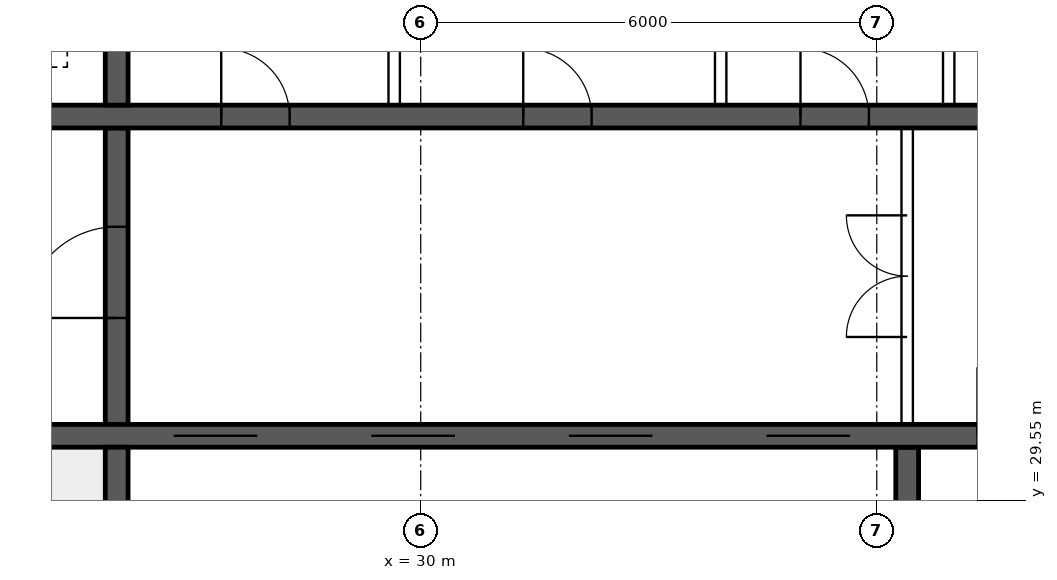
"""IFC4 building model, lengths in metres.
Left out: names, types, materials, properties, quantities, classifications, styles, units other than length and angle.
Written with IfcOpenShell. Run it as: python <this file> out.ifc"""

import sys

from ifc_helpers import new_model, si_unit, direction, frame, frame_2d, origin, place, context, subcontext, project, spatial, rectangle, extrude, element, fill, save


model = new_model("IFC4")
c1 = context("Model", 3, precision=1e-05, world=origin(), true_north=direction((0.0, 1.0)))
c2 = subcontext(c1, "Body", "Model", "MODEL_VIEW")
j1 = project(units=[si_unit("LENGTHUNIT", "METRE"), si_unit("PLANEANGLEUNIT", "RADIAN")], contexts=[c1])
p1 = place(None, origin())
s1 = spatial("IfcSite", under=j1, at=p1, CompositionType="ELEMENT")
p2 = place(p1, origin())
s2 = spatial("IfcBuilding", under=s1, at=p2, CompositionType="ELEMENT")
p3 = place(p2, frame((0.0, 0.0, 163.6)))
s3 = spatial("IfcBuildingStorey", under=s2, at=p3, CompositionType="ELEMENT", Elevation=163.6)
p4 = place(p3, frame((18.425, 30.4, 0.0), z_axis=(0.0, 0.0, 1.0), x_axis=(1.0, 0.0, 0.0)))
e1 = element("IfcWall", 1, at=p4, inside=s3, PredefinedType="SHEAR", context=c2, shape_type="SweptSolid", body=[
    extrude(rectangle(XDim=47.15, YDim=0.3, at=frame_2d((23.575, 0.0))), origin(), (0.0, 0.0, 1.0), 3.75),
])
p5 = place(p4, frame((0.4, 0.0, 0.0)))
e2 = element("IfcOpeningElement", 2, at=p5, cuts=e1, PredefinedType="OPENING", context=c2, shape_type="SweptSolid", body=[
    extrude(rectangle(XDim=1.0, YDim=2.1, at=frame_2d((0.5, 1.05))), frame((0.0, 0.16, 0.0), z_axis=(0.0, -1.0, 0.0), x_axis=(1.0, 0.0, 0.0)), (0.0, 0.0, 1.0), 0.32),
])
p6 = place(p4, frame((45.75, 0.0, 0.0)))
e3 = element("IfcOpeningElement", 3, at=p6, cuts=e1, PredefinedType="OPENING", context=c2, shape_type="SweptSolid", body=[
    extrude(rectangle(XDim=1.0, YDim=2.1, at=frame_2d((0.5, 1.05))), frame((0.0, 0.16, 0.0), z_axis=(0.0, -1.0, 0.0), x_axis=(1.0, 0.0, 0.0)), (0.0, 0.0, 1.0), 0.32),
])
p7 = place(p4, frame((8.325, 0.0, 0.0)))
e4 = element("IfcOpeningElement", 4, at=p7, cuts=e1, PredefinedType="OPENING", context=c2, shape_type="SweptSolid", body=[
    extrude(rectangle(XDim=1.1, YDim=2.1, at=frame_2d((0.55, 1.05))), frame((0.0, 0.16, 0.0), z_axis=(0.0, -1.0, 0.0), x_axis=(1.0, 0.0, 0.0)), (0.0, 0.0, 1.0), 0.32),
])
p8 = place(p4, frame((10.925, 0.0, 0.0)))
e5 = element("IfcOpeningElement", 5, at=p8, cuts=e1, PredefinedType="OPENING", context=c2, shape_type="SweptSolid", body=[
    extrude(rectangle(XDim=1.1, YDim=2.1, at=frame_2d((0.55, 1.05))), frame((0.0, 0.16, 0.0), z_axis=(0.0, -1.0, 0.0), x_axis=(1.0, 0.0, 0.0)), (0.0, 0.0, 1.0), 0.32),
])
p9 = place(p4, frame((13.525, 0.0, 0.0)))
e6 = element("IfcOpeningElement", 6, at=p9, cuts=e1, PredefinedType="OPENING", context=c2, shape_type="SweptSolid", body=[
    extrude(rectangle(XDim=1.1, YDim=2.1, at=frame_2d((0.55, 1.05))), frame((0.0, 0.16, 0.0), z_axis=(0.0, -1.0, 0.0), x_axis=(1.0, 0.0, 0.0)), (0.0, 0.0, 1.0), 0.32),
])
p10 = place(p4, frame((16.125, 0.0, 0.0)))
e7 = element("IfcOpeningElement", 7, at=p10, cuts=e1, PredefinedType="OPENING", context=c2, shape_type="SweptSolid", body=[
    extrude(rectangle(XDim=1.1, YDim=2.1, at=frame_2d((0.55, 1.05))), frame((0.0, 0.16, 0.0), z_axis=(0.0, -1.0, 0.0), x_axis=(1.0, 0.0, 0.0)), (0.0, 0.0, 1.0), 0.32),
])
p11 = place(p4, frame((18.9, 0.0, 0.0)))
e8 = element("IfcOpeningElement", 8, at=p11, cuts=e1, PredefinedType="OPENING", context=c2, shape_type="SweptSolid", body=[
    extrude(rectangle(XDim=0.9, YDim=2.1, at=frame_2d((0.45, 1.05))), frame((0.0, 0.16, 0.0), z_axis=(0.0, -1.0, 0.0), x_axis=(1.0, 0.0, 0.0)), (0.0, 0.0, 1.0), 0.32),
])
p12 = place(p4, frame((30.192, 0.0, 0.0)))
e9 = element("IfcOpeningElement", 9, at=p12, cuts=e1, PredefinedType="OPENING", context=c2, shape_type="SweptSolid", body=[
    extrude(rectangle(XDim=1.1, YDim=2.1, at=frame_2d((0.55, 1.05))), frame((0.0, 0.16, 0.0), z_axis=(0.0, -1.0, 0.0), x_axis=(1.0, 0.0, 0.0)), (0.0, 0.0, 1.0), 0.32),
])
p13 = place(p4, frame((33.725, 0.0, 0.0)))
e10 = element("IfcOpeningElement", 10, at=p13, cuts=e1, PredefinedType="OPENING", context=c2, shape_type="SweptSolid", body=[
    extrude(rectangle(XDim=1.1, YDim=2.1, at=frame_2d((0.55, 1.05))), frame((0.0, 0.16, 0.0), z_axis=(0.0, -1.0, 0.0), x_axis=(1.0, 0.0, 0.0)), (0.0, 0.0, 1.0), 0.32),
])
p14 = place(p4, frame((37.258, 0.0, 0.0)))
e11 = element("IfcOpeningElement", 11, at=p14, cuts=e1, PredefinedType="OPENING", context=c2, shape_type="SweptSolid", body=[
    extrude(rectangle(XDim=1.1, YDim=2.1, at=frame_2d((0.55, 1.05))), frame((0.0, 0.16, 0.0), z_axis=(0.0, -1.0, 0.0), x_axis=(1.0, 0.0, 0.0)), (0.0, 0.0, 1.0), 0.32),
])
p15 = place(p3, frame((18.425, 34.6, 0.0), z_axis=(0.0, 0.0, 1.0), x_axis=(1.0, 0.0, 0.0)))
e12 = element("IfcWall", 12, at=p15, inside=s3, PredefinedType="SHEAR", context=c2, shape_type="SweptSolid", body=[
    extrude(rectangle(XDim=47.15, YDim=0.3, at=frame_2d((23.575, 0.0))), origin(), (0.0, 0.0, 1.0), 3.75),
])
p16 = place(p15, frame((0.9, 0.0, 0.0)))
e13 = element("IfcOpeningElement", 13, at=p16, cuts=e12, PredefinedType="OPENING", context=c2, shape_type="SweptSolid", body=[
    extrude(rectangle(XDim=1.1, YDim=2.1, at=frame_2d((0.55, 1.05))), frame((0.0, 0.16, 0.0), z_axis=(0.0, -1.0, 0.0), x_axis=(1.0, 0.0, 0.0)), (0.0, 0.0, 1.0), 0.32),
])
p17 = place(p15, frame((45.15, 0.0, 0.0)))
e14 = element("IfcOpeningElement", 14, at=p17, cuts=e12, PredefinedType="OPENING", context=c2, shape_type="SweptSolid", body=[
    extrude(rectangle(XDim=1.1, YDim=2.1, at=frame_2d((0.55, 1.05))), frame((0.0, 0.16, 0.0), z_axis=(0.0, -1.0, 0.0), x_axis=(1.0, 0.0, 0.0)), (0.0, 0.0, 1.0), 0.32),
])
p18 = place(p15, frame((4.175, 0.0, 0.0)))
e15 = element("IfcOpeningElement", 15, at=p18, cuts=e12, PredefinedType="OPENING", context=c2, shape_type="SweptSolid", body=[
    extrude(rectangle(XDim=0.9, YDim=2.1, at=frame_2d((0.45, 1.05))), frame((0.0, 0.16, 0.0), z_axis=(0.0, -1.0, 0.0), x_axis=(1.0, 0.0, 0.0)), (0.0, 0.0, 1.0), 0.32),
])
p19 = place(p15, frame((42.075, 0.0, 0.0)))
e16 = element("IfcOpeningElement", 16, at=p19, cuts=e12, PredefinedType="OPENING", context=c2, shape_type="SweptSolid", body=[
    extrude(rectangle(XDim=0.9, YDim=2.1, at=frame_2d((0.45, 1.05))), frame((0.0, 0.16, 0.0), z_axis=(0.0, -1.0, 0.0), x_axis=(1.0, 0.0, 0.0)), (0.0, 0.0, 1.0), 0.32),
])
p20 = place(p15, frame((8.95, 0.0, 0.0)))
e17 = element("IfcOpeningElement", 17, at=p20, cuts=e12, PredefinedType="OPENING", context=c2, shape_type="SweptSolid", body=[
    extrude(rectangle(XDim=0.9, YDim=2.1, at=frame_2d((0.45, 1.05))), frame((0.0, 0.16, 0.0), z_axis=(0.0, -1.0, 0.0), x_axis=(1.0, 0.0, 0.0)), (0.0, 0.0, 1.0), 0.32),
])
p21 = place(p15, frame((12.924, 0.0, 0.0)))
e18 = element("IfcOpeningElement", 18, at=p21, cuts=e12, PredefinedType="OPENING", context=c2, shape_type="SweptSolid", body=[
    extrude(rectangle(XDim=0.9, YDim=2.1, at=frame_2d((0.45, 1.05))), frame((0.0, 0.16, 0.0), z_axis=(0.0, -1.0, 0.0), x_axis=(1.0, 0.0, 0.0)), (0.0, 0.0, 1.0), 0.32),
])
p22 = place(p15, frame((16.571, 0.0, 0.0)))
e19 = element("IfcOpeningElement", 19, at=p22, cuts=e12, PredefinedType="OPENING", context=c2, shape_type="SweptSolid", body=[
    extrude(rectangle(XDim=0.9, YDim=2.1, at=frame_2d((0.45, 1.05))), frame((0.0, 0.16, 0.0), z_axis=(0.0, -1.0, 0.0), x_axis=(1.0, 0.0, 0.0)), (0.0, 0.0, 1.0), 0.32),
])
p23 = place(p15, frame((20.33, 0.0, 0.0)))
e20 = element("IfcOpeningElement", 20, at=p23, cuts=e12, PredefinedType="OPENING", context=c2, shape_type="SweptSolid", body=[
    extrude(rectangle(XDim=0.9, YDim=2.1, at=frame_2d((0.45, 1.05))), frame((0.0, 0.16, 0.0), z_axis=(0.0, -1.0, 0.0), x_axis=(1.0, 0.0, 0.0)), (0.0, 0.0, 1.0), 0.32),
])
p24 = place(p15, frame((24.736, 0.0, 0.0)))
e21 = element("IfcOpeningElement", 21, at=p24, cuts=e12, PredefinedType="OPENING", context=c2, shape_type="SweptSolid", body=[
    extrude(rectangle(XDim=0.9, YDim=2.1, at=frame_2d((0.45, 1.05))), frame((0.0, 0.16, 0.0), z_axis=(0.0, -1.0, 0.0), x_axis=(1.0, 0.0, 0.0)), (0.0, 0.0, 1.0), 0.32),
])
p25 = place(p15, frame((27.533, 0.0, 0.0)))
e22 = element("IfcOpeningElement", 22, at=p25, cuts=e12, PredefinedType="OPENING", context=c2, shape_type="SweptSolid", body=[
    extrude(rectangle(XDim=0.9, YDim=2.1, at=frame_2d((0.45, 1.05))), frame((0.0, 0.16, 0.0), z_axis=(0.0, -1.0, 0.0), x_axis=(1.0, 0.0, 0.0)), (0.0, 0.0, 1.0), 0.32),
])
p26 = place(p15, frame((29.906, 0.0, 0.0)))
e23 = element("IfcOpeningElement", 23, at=p26, cuts=e12, PredefinedType="OPENING", context=c2, shape_type="SweptSolid", body=[
    extrude(rectangle(XDim=0.9, YDim=2.1, at=frame_2d((0.45, 1.05))), frame((0.0, 0.16, 0.0), z_axis=(0.0, -1.0, 0.0), x_axis=(1.0, 0.0, 0.0)), (0.0, 0.0, 1.0), 0.32),
])
p27 = place(p15, frame((33.756, 0.0, 0.0)))
e24 = element("IfcOpeningElement", 24, at=p27, cuts=e12, PredefinedType="OPENING", context=c2, shape_type="SweptSolid", body=[
    extrude(rectangle(XDim=0.9, YDim=2.1, at=frame_2d((0.45, 1.05))), frame((0.0, 0.16, 0.0), z_axis=(0.0, -1.0, 0.0), x_axis=(1.0, 0.0, 0.0)), (0.0, 0.0, 1.0), 0.32),
])
p28 = place(p15, frame((37.504, 0.0, 0.0)))
e25 = element("IfcOpeningElement", 25, at=p28, cuts=e12, PredefinedType="OPENING", context=c2, shape_type="SweptSolid", body=[
    extrude(rectangle(XDim=0.9, YDim=2.1, at=frame_2d((0.45, 1.05))), frame((0.0, 0.16, 0.0), z_axis=(0.0, -1.0, 0.0), x_axis=(1.0, 0.0, 0.0)), (0.0, 0.0, 1.0), 0.32),
])
p29 = place(p3, frame((26.0, 26.225, 0.0), z_axis=(0.0, 0.0, 1.0), x_axis=(0.0, 1.0, 0.0)))
e26 = element("IfcWall", 26, at=p29, inside=s3, PredefinedType="SHEAR", context=c2, shape_type="SweptSolid", body=[
    extrude(rectangle(XDim=4.025, YDim=0.3, at=frame_2d((2.012, 0.0))), origin(), (0.0, 0.0, 1.0), 3.75),
])
p30 = place(p3, frame((26.0, 30.55, 0.0), z_axis=(0.0, 0.0, 1.0), x_axis=(0.0, 1.0, 0.0)))
e27 = element("IfcWall", 27, at=p30, inside=s3, PredefinedType="SHEAR", context=c2, shape_type="SweptSolid", body=[
    extrude(rectangle(XDim=3.9, YDim=0.3, at=frame_2d((1.95, 0.0))), origin(), (0.0, 0.0, 1.0), 3.75),
])
p31 = place(p30, frame((1.4, 0.0, 0.0)))
e28 = element("IfcOpeningElement", 28, at=p31, cuts=e27, PredefinedType="OPENING", context=c2, shape_type="SweptSolid", body=[
    extrude(rectangle(XDim=1.2, YDim=2.1, at=frame_2d((0.6, 1.05))), frame((0.0, 0.16, 0.0), z_axis=(0.0, -1.0, 0.0), x_axis=(1.0, 0.0, 0.0)), (0.0, 0.0, 1.0), 0.32),
])
p32 = place(p3, frame((26.0, 34.75, 0.0), z_axis=(0.0, 0.0, 1.0), x_axis=(0.0, 1.0, 0.0)))
e29 = element("IfcWall", 29, at=p32, inside=s3, PredefinedType="SHEAR", context=c2, shape_type="SweptSolid", body=[
    extrude(rectangle(XDim=3.025, YDim=0.3, at=frame_2d((1.512, 0.0))), origin(), (0.0, 0.0, 1.0), 3.75),
])
p33 = place(p3, frame((36.4, 26.225, 0.0), z_axis=(0.0, 0.0, 1.0), x_axis=(0.0, 1.0, 0.0)))
e30 = element("IfcWall", 30, at=p33, inside=s3, PredefinedType="SHEAR", context=c2, shape_type="SweptSolid", body=[
    extrude(rectangle(XDim=4.025, YDim=0.3, at=frame_2d((2.012, 0.0))), origin(), (0.0, 0.0, 1.0), 3.75),
])
p34 = place(p3, frame((36.4, 30.55, 0.0), z_axis=(0.0, 0.0, 1.0), x_axis=(0.0, 1.0, 0.0)))
e31 = element("IfcWall", 31, at=p34, inside=s3, PredefinedType="SOLIDWALL", context=c2, shape_type="SweptSolid", body=[
    extrude(rectangle(XDim=3.9, YDim=0.15, at=frame_2d((1.95, 0.0))), origin(), (0.0, 0.0, 1.0), 3.5),
])
p35 = place(p34, frame((1.15, 0.0, 0.0)))
e32 = element("IfcOpeningElement", 32, at=p35, cuts=e31, PredefinedType="OPENING", context=c2, shape_type="SweptSolid", body=[
    extrude(rectangle(XDim=1.6, YDim=2.1, at=frame_2d((0.8, 1.05))), frame((0.0, 0.085, 0.0), z_axis=(0.0, -1.0, 0.0), x_axis=(1.0, 0.0, 0.0)), (0.0, 0.0, 1.0), 0.17),
])
for number, where, z_axis, x_axis in (
    (33, (29.651, 34.75, 0.0), (0.0, 0.0, 1.0), (0.0, 1.0, 0.0)),
    (34, (33.946, 34.75, 0.0), (0.0, 0.0, 1.0), (0.0, 1.0, 0.0)),
    (35, (36.946, 34.75, 0.0), (0.0, 0.0, 1.0), (0.0, 1.0, 0.0)),
):
    element("IfcWall", number, at=place(p3, frame(where, z_axis=z_axis, x_axis=x_axis)), inside=s3, PredefinedType="SOLIDWALL", context=c2, shape_type="SweptSolid", body=[
        extrude(rectangle(XDim=3.025, YDim=0.15, at=frame_2d((1.512, 0.0))), origin(), (0.0, 0.0, 1.0), 3.5),
    ])
p36 = place(p35, origin())
e36 = element("IfcDoor", 36, at=p36, inside=s3, OperationType="DOUBLE_DOOR_SINGLE_SWING", PredefinedType="DOOR", context=c2, shape_type="SweptSolid", body=[
    extrude(rectangle(XDim=1.6, YDim=2.1, at=frame_2d((0.8, 1.05))), frame((0.0, 0.025, 0.0), z_axis=(0.0, -1.0, 0.0), x_axis=(1.0, 0.0, 0.0)), (0.0, 0.0, 1.0), 0.05),
])
fill(e32, e36)
p37 = place(p31, origin())
e37 = element("IfcDoor", 37, at=p37, inside=s3, OperationType="SINGLE_SWING_LEFT", PredefinedType="DOOR", context=c2, shape_type="SweptSolid", body=[
    extrude(rectangle(XDim=1.2, YDim=2.1, at=frame_2d((0.6, 1.05))), frame((0.0, 0.025, 0.0), z_axis=(0.0, -1.0, 0.0), x_axis=(1.0, 0.0, 0.0)), (0.0, 0.0, 1.0), 0.05),
])
fill(e28, e37)
p38 = place(p20, origin())
e38 = element("IfcDoor", 38, at=p38, inside=s3, OperationType="SINGLE_SWING_LEFT", PredefinedType="DOOR", context=c2, shape_type="SweptSolid", body=[
    extrude(rectangle(XDim=0.9, YDim=2.1, at=frame_2d((0.45, 1.05))), frame((0.0, 0.025, 0.0), z_axis=(0.0, -1.0, 0.0), x_axis=(1.0, 0.0, 0.0)), (0.0, 0.0, 1.0), 0.05),
])
fill(e17, e38)
p39 = place(p21, origin())
e39 = element("IfcDoor", 39, at=p39, inside=s3, OperationType="SINGLE_SWING_LEFT", PredefinedType="DOOR", context=c2, shape_type="SweptSolid", body=[
    extrude(rectangle(XDim=0.9, YDim=2.1, at=frame_2d((0.45, 1.05))), frame((0.0, 0.025, 0.0), z_axis=(0.0, -1.0, 0.0), x_axis=(1.0, 0.0, 0.0)), (0.0, 0.0, 1.0), 0.05),
])
fill(e18, e39)
p40 = place(p22, origin())
e40 = element("IfcDoor", 40, at=p40, inside=s3, OperationType="SINGLE_SWING_LEFT", PredefinedType="DOOR", context=c2, shape_type="SweptSolid", body=[
    extrude(rectangle(XDim=0.9, YDim=2.1, at=frame_2d((0.45, 1.05))), frame((0.0, 0.025, 0.0), z_axis=(0.0, -1.0, 0.0), x_axis=(1.0, 0.0, 0.0)), (0.0, 0.0, 1.0), 0.05),
])
fill(e19, e40)
p41 = place(p7, origin())
e41 = element("IfcDoor", 41, at=p41, inside=s3, OperationType="DOUBLE_DOOR_SLIDING", PredefinedType="DOOR", context=c2, shape_type="SweptSolid", body=[
    extrude(rectangle(XDim=1.1, YDim=2.1, at=frame_2d((0.55, 1.05))), frame((0.0, 0.025, 0.0), z_axis=(0.0, -1.0, 0.0), x_axis=(1.0, 0.0, 0.0)), (0.0, 0.0, 1.0), 0.05),
])
fill(e4, e41)
p42 = place(p8, origin())
e42 = element("IfcDoor", 42, at=p42, inside=s3, OperationType="DOUBLE_DOOR_SLIDING", PredefinedType="DOOR", context=c2, shape_type="SweptSolid", body=[
    extrude(rectangle(XDim=1.1, YDim=2.1, at=frame_2d((0.55, 1.05))), frame((0.0, 0.025, 0.0), z_axis=(0.0, -1.0, 0.0), x_axis=(1.0, 0.0, 0.0)), (0.0, 0.0, 1.0), 0.05),
])
fill(e5, e42)
p43 = place(p9, origin())
e43 = element("IfcDoor", 43, at=p43, inside=s3, OperationType="DOUBLE_DOOR_SLIDING", PredefinedType="DOOR", context=c2, shape_type="SweptSolid", body=[
    extrude(rectangle(XDim=1.1, YDim=2.1, at=frame_2d((0.55, 1.05))), frame((0.0, 0.025, 0.0), z_axis=(0.0, -1.0, 0.0), x_axis=(1.0, 0.0, 0.0)), (0.0, 0.0, 1.0), 0.05),
])
fill(e6, e43)
p44 = place(p10, origin())
e44 = element("IfcDoor", 44, at=p44, inside=s3, OperationType="DOUBLE_DOOR_SLIDING", PredefinedType="DOOR", context=c2, shape_type="SweptSolid", body=[
    extrude(rectangle(XDim=1.1, YDim=2.1, at=frame_2d((0.55, 1.05))), frame((0.0, 0.025, 0.0), z_axis=(0.0, -1.0, 0.0), x_axis=(1.0, 0.0, 0.0)), (0.0, 0.0, 1.0), 0.05),
])
fill(e7, e44)
save(model, sys.argv[1])
